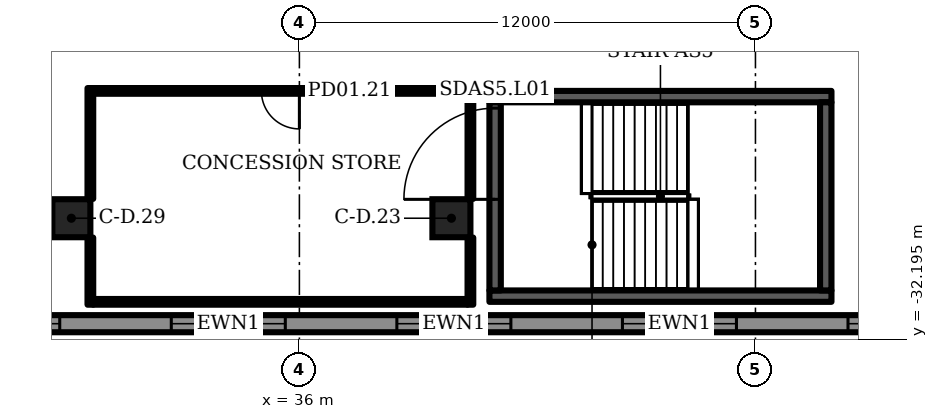
"""IFC4 building model, lengths in metres.
Left out: names, types, materials, properties, quantities, classifications, styles, units other than length and angle.
Written with IfcOpenShell. Run it as: python <this file> out.ifc"""

import sys

from ifc_helpers import new_model, si_unit, direction, frame, frame_2d, origin, origin_2d, place, context, subcontext, project, spatial, rectangle, extrude, element, fill, save


model = new_model("IFC4")
c1 = context("Model", 3, precision=1e-05, world=origin(), true_north=direction((0.0, 1.0)))
c2 = subcontext(c1, "Body", "Model", "MODEL_VIEW")
j1 = project(units=[si_unit("LENGTHUNIT", "METRE"), si_unit("PLANEANGLEUNIT", "RADIAN")], contexts=[c1])
p1 = place(None, origin())
s1 = spatial("IfcSite", under=j1, at=p1, CompositionType="ELEMENT")
p2 = place(p1, origin())
s2 = spatial("IfcBuilding", under=s1, at=p2, CompositionType="ELEMENT")
p3 = place(p2, frame((0.0, 0.0, 8.0)))
s3 = spatial("IfcBuildingStorey", under=s2, at=p3, CompositionType="ELEMENT", Elevation=8.0)
for number, where, z_axis, x_axis in (
    (1, (40.0, -29.0, 0.0), (0.0, 0.0, 1.0), (1.0, 0.0, 0.0)),
    (2, (30.0, -29.0, 0.0), (0.0, 0.0, 1.0), (1.0, 0.0, 0.0)),
):
    element("IfcColumn", number, at=place(p3, frame(where, z_axis=z_axis, x_axis=x_axis)), inside=s3, PredefinedType="COLUMN", context=c2, shape_type="SweptSolid", body=[
        extrude(rectangle(XDim=1.0, YDim=1.0, at=origin_2d()), origin(), (0.0, 0.0, 1.0), 7.0),
    ])
p4 = place(p3, frame((-4.45, -31.775, 0.0), z_axis=(0.0, 0.0, 1.0), x_axis=(1.0, 0.0, 0.0)))
e3 = element("IfcWall", 3, at=p4, inside=s3, PredefinedType="SOLIDWALL", context=c2, shape_type="SweptSolid", body=[
    extrude(rectangle(XDim=100.9, YDim=0.45, at=frame_2d((50.45, 0.0))), origin(), (0.0, 0.0, 1.0), 6.7),
])
p5 = place(p4, frame((1.468, 0.0, 1.0)))
e4 = element("IfcOpeningElement", 4, at=p5, cuts=e3, PredefinedType="OPENING", context=c2, shape_type="SweptSolid", body=[
    extrude(rectangle(XDim=3.0, YDim=4.7, at=frame_2d((1.5, 2.35))), frame((0.0, 0.235, 0.0), z_axis=(0.0, -1.0, 0.0), x_axis=(1.0, 0.0, 0.0)), (0.0, 0.0, 1.0), 0.47),
])
p6 = place(p4, frame((7.403, 0.0, 1.0)))
e5 = element("IfcOpeningElement", 5, at=p6, cuts=e3, PredefinedType="OPENING", context=c2, shape_type="SweptSolid", body=[
    extrude(rectangle(XDim=3.0, YDim=4.7, at=frame_2d((1.5, 2.35))), frame((0.0, 0.235, 0.0), z_axis=(0.0, -1.0, 0.0), x_axis=(1.0, 0.0, 0.0)), (0.0, 0.0, 1.0), 0.47),
])
p7 = place(p4, frame((13.338, 0.0, 1.0)))
e6 = element("IfcOpeningElement", 6, at=p7, cuts=e3, PredefinedType="OPENING", context=c2, shape_type="SweptSolid", body=[
    extrude(rectangle(XDim=3.0, YDim=4.7, at=frame_2d((1.5, 2.35))), frame((0.0, 0.235, 0.0), z_axis=(0.0, -1.0, 0.0), x_axis=(1.0, 0.0, 0.0)), (0.0, 0.0, 1.0), 0.47),
])
p8 = place(p4, frame((19.273, 0.0, 1.0)))
e7 = element("IfcOpeningElement", 7, at=p8, cuts=e3, PredefinedType="OPENING", context=c2, shape_type="SweptSolid", body=[
    extrude(rectangle(XDim=3.0, YDim=4.7, at=frame_2d((1.5, 2.35))), frame((0.0, 0.235, 0.0), z_axis=(0.0, -1.0, 0.0), x_axis=(1.0, 0.0, 0.0)), (0.0, 0.0, 1.0), 0.47),
])
p9 = place(p4, frame((25.209, 0.0, 1.0)))
e8 = element("IfcOpeningElement", 8, at=p9, cuts=e3, PredefinedType="OPENING", context=c2, shape_type="SweptSolid", body=[
    extrude(rectangle(XDim=3.0, YDim=4.7, at=frame_2d((1.5, 2.35))), frame((0.0, 0.235, 0.0), z_axis=(0.0, -1.0, 0.0), x_axis=(1.0, 0.0, 0.0)), (0.0, 0.0, 1.0), 0.47),
])
p10 = place(p4, frame((31.144, 0.0, 1.0)))
e9 = element("IfcOpeningElement", 9, at=p10, cuts=e3, PredefinedType="OPENING", context=c2, shape_type="SweptSolid", body=[
    extrude(rectangle(XDim=3.0, YDim=4.7, at=frame_2d((1.5, 2.35))), frame((0.0, 0.235, 0.0), z_axis=(0.0, -1.0, 0.0), x_axis=(1.0, 0.0, 0.0)), (0.0, 0.0, 1.0), 0.47),
])
p11 = place(p4, frame((37.079, 0.0, 1.0)))
e10 = element("IfcOpeningElement", 10, at=p11, cuts=e3, PredefinedType="OPENING", context=c2, shape_type="SweptSolid", body=[
    extrude(rectangle(XDim=3.0, YDim=4.7, at=frame_2d((1.5, 2.35))), frame((0.0, 0.235, 0.0), z_axis=(0.0, -1.0, 0.0), x_axis=(1.0, 0.0, 0.0)), (0.0, 0.0, 1.0), 0.47),
])
p12 = place(p4, frame((43.015, 0.0, 1.0)))
e11 = element("IfcOpeningElement", 11, at=p12, cuts=e3, PredefinedType="OPENING", context=c2, shape_type="SweptSolid", body=[
    extrude(rectangle(XDim=3.0, YDim=4.7, at=frame_2d((1.5, 2.35))), frame((0.0, 0.235, 0.0), z_axis=(0.0, -1.0, 0.0), x_axis=(1.0, 0.0, 0.0)), (0.0, 0.0, 1.0), 0.47),
])
p13 = place(p4, frame((48.95, 0.0, 1.0)))
e12 = element("IfcOpeningElement", 12, at=p13, cuts=e3, PredefinedType="OPENING", context=c2, shape_type="SweptSolid", body=[
    extrude(rectangle(XDim=3.0, YDim=4.7, at=frame_2d((1.5, 2.35))), frame((0.0, 0.235, 0.0), z_axis=(0.0, -1.0, 0.0), x_axis=(1.0, 0.0, 0.0)), (0.0, 0.0, 1.0), 0.47),
])
p14 = place(p4, frame((54.885, 0.0, 1.0)))
e13 = element("IfcOpeningElement", 13, at=p14, cuts=e3, PredefinedType="OPENING", context=c2, shape_type="SweptSolid", body=[
    extrude(rectangle(XDim=3.0, YDim=4.7, at=frame_2d((1.5, 2.35))), frame((0.0, 0.235, 0.0), z_axis=(0.0, -1.0, 0.0), x_axis=(1.0, 0.0, 0.0)), (0.0, 0.0, 1.0), 0.47),
])
p15 = place(p4, frame((60.821, 0.0, 1.0)))
e14 = element("IfcOpeningElement", 14, at=p15, cuts=e3, PredefinedType="OPENING", context=c2, shape_type="SweptSolid", body=[
    extrude(rectangle(XDim=3.0, YDim=4.7, at=frame_2d((1.5, 2.35))), frame((0.0, 0.235, 0.0), z_axis=(0.0, -1.0, 0.0), x_axis=(1.0, 0.0, 0.0)), (0.0, 0.0, 1.0), 0.47),
])
p16 = place(p4, frame((66.756, 0.0, 1.0)))
e15 = element("IfcOpeningElement", 15, at=p16, cuts=e3, PredefinedType="OPENING", context=c2, shape_type="SweptSolid", body=[
    extrude(rectangle(XDim=3.0, YDim=4.7, at=frame_2d((1.5, 2.35))), frame((0.0, 0.235, 0.0), z_axis=(0.0, -1.0, 0.0), x_axis=(1.0, 0.0, 0.0)), (0.0, 0.0, 1.0), 0.47),
])
p17 = place(p4, frame((72.691, 0.0, 1.0)))
e16 = element("IfcOpeningElement", 16, at=p17, cuts=e3, PredefinedType="OPENING", context=c2, shape_type="SweptSolid", body=[
    extrude(rectangle(XDim=3.0, YDim=4.7, at=frame_2d((1.5, 2.35))), frame((0.0, 0.235, 0.0), z_axis=(0.0, -1.0, 0.0), x_axis=(1.0, 0.0, 0.0)), (0.0, 0.0, 1.0), 0.47),
])
p18 = place(p4, frame((78.626, 0.0, 1.0)))
e17 = element("IfcOpeningElement", 17, at=p18, cuts=e3, PredefinedType="OPENING", context=c2, shape_type="SweptSolid", body=[
    extrude(rectangle(XDim=3.0, YDim=4.7, at=frame_2d((1.5, 2.35))), frame((0.0, 0.235, 0.0), z_axis=(0.0, -1.0, 0.0), x_axis=(1.0, 0.0, 0.0)), (0.0, 0.0, 1.0), 0.47),
])
p19 = place(p4, frame((84.562, 0.0, 1.0)))
e18 = element("IfcOpeningElement", 18, at=p19, cuts=e3, PredefinedType="OPENING", context=c2, shape_type="SweptSolid", body=[
    extrude(rectangle(XDim=3.0, YDim=4.7, at=frame_2d((1.5, 2.35))), frame((0.0, 0.235, 0.0), z_axis=(0.0, -1.0, 0.0), x_axis=(1.0, 0.0, 0.0)), (0.0, 0.0, 1.0), 0.47),
])
p20 = place(p4, frame((90.497, 0.0, 1.0)))
e19 = element("IfcOpeningElement", 19, at=p20, cuts=e3, PredefinedType="OPENING", context=c2, shape_type="SweptSolid", body=[
    extrude(rectangle(XDim=3.0, YDim=4.7, at=frame_2d((1.5, 2.35))), frame((0.0, 0.235, 0.0), z_axis=(0.0, -1.0, 0.0), x_axis=(1.0, 0.0, 0.0)), (0.0, 0.0, 1.0), 0.47),
])
p21 = place(p4, frame((96.432, 0.0, 1.0)))
e20 = element("IfcOpeningElement", 20, at=p21, cuts=e3, PredefinedType="OPENING", context=c2, shape_type="SweptSolid", body=[
    extrude(rectangle(XDim=3.0, YDim=4.7, at=frame_2d((1.5, 2.35))), frame((0.0, 0.235, 0.0), z_axis=(0.0, -1.0, 0.0), x_axis=(1.0, 0.0, 0.0)), (0.0, 0.0, 1.0), 0.47),
])
p22 = place(p3, frame((30.575, -31.2, 0.0), z_axis=(0.0, 0.0, 1.0), x_axis=(1.0, 0.0, 0.0)))
e21 = element("IfcWall", 21, at=p22, inside=s3, PredefinedType="PARTITIONING", context=c2, shape_type="SweptSolid", body=[
    extrude(rectangle(XDim=9.85, YDim=0.15, at=frame_2d((4.925, 0.0))), origin(), (0.0, 0.0, 1.0), 6.7),
])
p23 = place(p3, frame((40.5, -31.275, 0.0), z_axis=(0.0, 0.0, 1.0), x_axis=(0.0, 1.0, 0.0)))
e22 = element("IfcWall", 22, at=p23, inside=s3, PredefinedType="PARTITIONING", context=c2, shape_type="SweptSolid", body=[
    extrude(rectangle(XDim=1.765, YDim=0.15, at=frame_2d((0.882, 0.0))), origin(), (0.0, 0.0, 1.0), 6.7),
])
p24 = place(p3, frame((40.5, -28.49, 0.0), z_axis=(0.0, 0.0, 1.0), x_axis=(0.0, 1.0, 0.0)))
e23 = element("IfcWall", 23, at=p24, inside=s3, PredefinedType="PARTITIONING", context=c2, shape_type="SweptSolid", body=[
    extrude(rectangle(XDim=2.915, YDim=0.15, at=frame_2d((1.458, 0.0))), origin(), (0.0, 0.0, 1.0), 6.7),
])
p25 = place(p3, frame((30.575, -25.65, 0.0), z_axis=(0.0, 0.0, 1.0), x_axis=(1.0, 0.0, 0.0)))
e24 = element("IfcWall", 24, at=p25, inside=s3, PredefinedType="PARTITIONING", context=c2, shape_type="SweptSolid", body=[
    extrude(rectangle(XDim=9.85, YDim=0.15, at=frame_2d((4.925, 0.0))), origin(), (0.0, 0.0, 1.0), 6.7),
])
p26 = place(p25, frame((4.425, 0.0, 0.0)))
e25 = element("IfcOpeningElement", 25, at=p26, cuts=e24, PredefinedType="OPENING", context=c2, shape_type="SweptSolid", body=[
    extrude(rectangle(XDim=1.0, YDim=2.1, at=frame_2d((0.5, 1.05))), frame((0.0, 0.085, 0.0), z_axis=(0.0, -1.0, 0.0), x_axis=(1.0, 0.0, 0.0)), (0.0, 0.0, 1.0), 0.17),
])
p27 = place(p3, frame((30.5, -31.275, 0.0), z_axis=(0.0, 0.0, 1.0), x_axis=(0.0, 1.0, 0.0)))
e26 = element("IfcWall", 26, at=p27, inside=s3, PredefinedType="PARTITIONING", context=c2, shape_type="SweptSolid", body=[
    extrude(rectangle(XDim=1.765, YDim=0.15, at=frame_2d((0.882, 0.0))), origin(), (0.0, 0.0, 1.0), 6.7),
])
p28 = place(p3, frame((30.5, -28.49, 0.0), z_axis=(0.0, 0.0, 1.0), x_axis=(0.0, 1.0, 0.0)))
e27 = element("IfcWall", 27, at=p28, inside=s3, PredefinedType="PARTITIONING", context=c2, shape_type="SweptSolid", body=[
    extrude(rectangle(XDim=2.915, YDim=0.15, at=frame_2d((1.458, 0.0))), origin(), (0.0, 0.0, 1.0), 6.7),
])
for number, where, z_axis, x_axis in (
    (28, (41.0, -31.05, 0.0), (0.0, 0.0, 1.0), (1.0, 0.0, 0.0)),
    (29, (41.0, -25.8, 0.0), (0.0, 0.0, 1.0), (1.0, 0.0, 0.0)),
):
    element("IfcWall", number, at=place(p3, frame(where, z_axis=z_axis, x_axis=x_axis)), inside=s3, PredefinedType="SHEAR", context=c2, shape_type="SweptSolid", body=[
        extrude(rectangle(XDim=9.0, YDim=0.3, at=frame_2d((4.5, 0.0))), origin(), (0.0, 0.0, 1.0), 6.7),
    ])
p29 = place(p3, frame((41.15, -30.9, 0.0), z_axis=(0.0, 0.0, 1.0), x_axis=(0.0, 1.0, 0.0)))
e30 = element("IfcWall", 30, at=p29, inside=s3, PredefinedType="SHEAR", context=c2, shape_type="SweptSolid", body=[
    extrude(rectangle(XDim=4.95, YDim=0.3, at=frame_2d((2.475, 0.0))), origin(), (0.0, 0.0, 1.0), 6.7),
])
p30 = place(p29, frame((2.397, 0.0, 0.0)))
e31 = element("IfcOpeningElement", 31, at=p30, cuts=e30, PredefinedType="OPENING", context=c2, shape_type="SweptSolid", body=[
    extrude(rectangle(XDim=2.4, YDim=2.1, at=frame_2d((1.2, 1.05))), frame((0.0, 0.16, 0.0), z_axis=(0.0, -1.0, 0.0), x_axis=(1.0, 0.0, 0.0)), (0.0, 0.0, 1.0), 0.32),
])
p31 = place(p3, frame((49.85, -30.9, 0.0), z_axis=(0.0, 0.0, 1.0), x_axis=(0.0, 1.0, 0.0)))
e32 = element("IfcWall", 32, at=p31, inside=s3, PredefinedType="SHEAR", context=c2, shape_type="SweptSolid", body=[
    extrude(rectangle(XDim=4.95, YDim=0.3, at=frame_2d((2.475, 0.0))), origin(), (0.0, 0.0, 1.0), 6.7),
])
p32 = place(p10, origin())
e33 = element("IfcWindow", 33, at=p32, inside=s3, PartitioningType="SINGLE_PANEL", PredefinedType="WINDOW", context=c2, shape_type="SweptSolid", body=[
    extrude(rectangle(XDim=3.0, YDim=4.7, at=frame_2d((1.5, 2.35))), frame((0.0, 0.105, 0.0), z_axis=(0.0, -1.0, 0.0), x_axis=(1.0, 0.0, 0.0)), (0.0, 0.0, 1.0), 0.06),
])
fill(e9, e33)
p33 = place(p11, origin())
e34 = element("IfcWindow", 34, at=p33, inside=s3, PartitioningType="SINGLE_PANEL", PredefinedType="WINDOW", context=c2, shape_type="SweptSolid", body=[
    extrude(rectangle(XDim=3.0, YDim=4.7, at=frame_2d((1.5, 2.35))), frame((0.0, 0.105, 0.0), z_axis=(0.0, -1.0, 0.0), x_axis=(1.0, 0.0, 0.0)), (0.0, 0.0, 1.0), 0.06),
])
fill(e10, e34)
p34 = place(p12, origin())
e35 = element("IfcWindow", 35, at=p34, inside=s3, PartitioningType="SINGLE_PANEL", PredefinedType="WINDOW", context=c2, shape_type="SweptSolid", body=[
    extrude(rectangle(XDim=3.0, YDim=4.7, at=frame_2d((1.5, 2.35))), frame((0.0, 0.105, 0.0), z_axis=(0.0, -1.0, 0.0), x_axis=(1.0, 0.0, 0.0)), (0.0, 0.0, 1.0), 0.06),
])
fill(e11, e35)
p35 = place(p13, origin())
e36 = element("IfcWindow", 36, at=p35, inside=s3, PartitioningType="SINGLE_PANEL", PredefinedType="WINDOW", context=c2, shape_type="SweptSolid", body=[
    extrude(rectangle(XDim=3.0, YDim=4.7, at=frame_2d((1.5, 2.35))), frame((0.0, 0.105, 0.0), z_axis=(0.0, -1.0, 0.0), x_axis=(1.0, 0.0, 0.0)), (0.0, 0.0, 1.0), 0.06),
])
fill(e12, e36)
p36 = place(p14, origin())
e37 = element("IfcWindow", 37, at=p36, inside=s3, PartitioningType="SINGLE_PANEL", PredefinedType="WINDOW", context=c2, shape_type="SweptSolid", body=[
    extrude(rectangle(XDim=3.0, YDim=4.7, at=frame_2d((1.5, 2.35))), frame((0.0, 0.105, 0.0), z_axis=(0.0, -1.0, 0.0), x_axis=(1.0, 0.0, 0.0)), (0.0, 0.0, 1.0), 0.06),
])
fill(e13, e37)
p37 = place(p26, origin())
e38 = element("IfcDoor", 38, at=p37, inside=s3, OperationType="SINGLE_SWING_RIGHT", PredefinedType="DOOR", context=c2, shape_type="SweptSolid", body=[
    extrude(rectangle(XDim=1.0, YDim=2.1, at=frame_2d((0.5, 1.05))), frame((0.0, 0.025, 0.0), z_axis=(0.0, -1.0, 0.0), x_axis=(1.0, 0.0, 0.0)), (0.0, 0.0, 1.0), 0.05),
])
fill(e25, e38)
p38 = place(p30, origin())
e39 = element("IfcDoor", 39, at=p38, inside=s3, OperationType="DOUBLE_DOOR_SINGLE_SWING", PredefinedType="DOOR", context=c2, shape_type="SweptSolid", body=[
    extrude(rectangle(XDim=2.4, YDim=2.1, at=frame_2d((1.2, 1.05))), frame((0.0, 0.025, 0.0), z_axis=(0.0, -1.0, 0.0), x_axis=(1.0, 0.0, 0.0)), (0.0, 0.0, 1.0), 0.05),
])
fill(e31, e39)
save(model, sys.argv[1])
